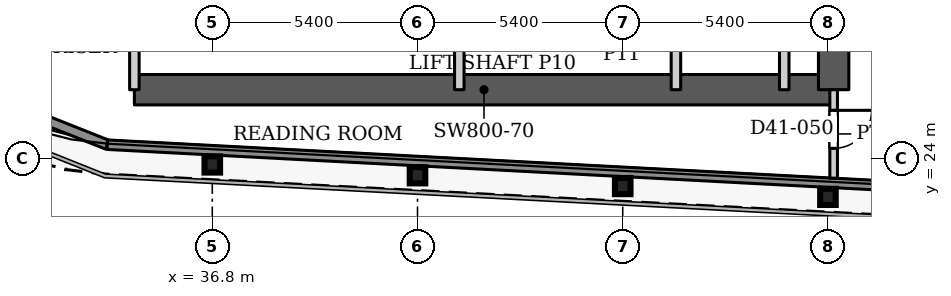
"""IFC4 building model, lengths in metres.
Left out: names, types, materials, properties, quantities, classifications, styles, units other than length and angle.
Written with IfcOpenShell. Run it as: python <this file> out.ifc"""

import sys

from ifc_helpers import new_model, si_unit, direction, frame, frame_2d, origin, origin_2d, place, context, subcontext, project, spatial, rectangle, i_section, extrude, source, transform, mapped, element, fill, save


model = new_model("IFC4")
c1 = context("Model", 3, precision=1e-05, world=origin(), true_north=direction((0.0, 1.0)))
c2 = subcontext(c1, "Body", "Model", "MODEL_VIEW")
j1 = project(units=[si_unit("LENGTHUNIT", "METRE"), si_unit("PLANEANGLEUNIT", "RADIAN")], contexts=[c1])
p1 = place(None, origin())
s1 = spatial("IfcSite", under=j1, at=p1, CompositionType="ELEMENT")
p2 = place(p1, origin())
s2 = spatial("IfcBuilding", under=s1, at=p2, CompositionType="ELEMENT")
p3 = place(p2, frame((0.0, 0.0, 176.0)))
s3 = spatial("IfcBuildingStorey", under=s2, at=p3, CompositionType="ELEMENT", Elevation=176.0)
for number, where, z_axis, x_axis in (
    (1, (53.0, 22.98, 0.0), (0.0, 0.0, 1.0), (1.0, 0.0, 0.0)),
    (2, (47.6, 23.264, 0.0), (0.0, 0.0, 1.0), (1.0, 0.0, 0.0)),
    (3, (42.2, 23.548, 0.0), (0.0, 0.0, 1.0), (1.0, 0.0, 0.0)),
    (4, (36.8, 23.832, 0.0), (0.0, 0.0, 1.0), (1.0, 0.0, 0.0)),
):
    element("IfcColumn", number, at=place(p3, frame(where, z_axis=z_axis, x_axis=x_axis)), inside=s3, PredefinedType="COLUMN", context=c2, shape_type="SweptSolid", body=[
        extrude(i_section(OverallWidth=0.409, OverallDepth=0.425, WebThickness=0.033, FlangeThickness=0.052, FilletRadius=0.013, at=origin_2d()), origin(), (0.0, 0.0, 1.0), 3.9),
    ])
p4 = place(p3, frame((34.75, 25.8, 0.0), z_axis=(0.0, 0.0, 1.0), x_axis=(1.0, 0.0, 0.0)))
e5 = element("IfcWall", 5, at=p4, inside=s3, PredefinedType="SHEAR", context=c2, shape_type="SweptSolid", body=[
    extrude(rectangle(XDim=18.4, YDim=0.8, at=frame_2d((9.2, 0.0))), origin(), (0.0, 0.0, 1.0), 3.9),
])
p5 = place(p3, frame((53.15, 25.8, 0.0), z_axis=(0.0, 0.0, 1.0), x_axis=(0.0, 1.0, 0.0)))
e6 = element("IfcWall", 6, at=p5, inside=s3, PredefinedType="SHEAR", context=c2, shape_type="SweptSolid", body=[
    extrude(rectangle(XDim=10.4, YDim=0.8, at=frame_2d((5.2, 0.0))), origin(), (0.0, 0.0, 1.0), 3.9),
])
p6 = place(p3, frame((34.039, 24.353, 0.0), z_axis=(0.0, 0.0, 1.0), x_axis=(-0.929352825399, 0.369192803184, 0.0)))
e7 = element("IfcWall", 7, at=p6, inside=s3, PredefinedType="SOLIDWALL", context=c2, shape_type="SweptSolid", body=[
    extrude(rectangle(XDim=4.656, YDim=0.25, at=frame_2d((2.328, 0.0))), origin(), (0.0, 0.0, 1.0), 3.75),
])
p7 = place(p3, frame((100.586, 20.85, 0.0), z_axis=(0.0, 0.0, 1.0), x_axis=(-0.99861746497, 0.052565755559, 0.0)))
e8 = element("IfcWall", 8, at=p7, inside=s3, PredefinedType="SOLIDWALL", context=c2, shape_type="SweptSolid", body=[
    extrude(rectangle(XDim=66.639, YDim=0.25, at=frame_2d((33.319, 0.0))), origin(), (0.0, 0.0, 1.0), 3.75),
])
for number, where, z_axis, x_axis in (
    (9, (34.75, 25.8, 0.0), (0.0, 0.0, 1.0), (0.0, 1.0, 0.0)),
    (10, (43.3, 25.8, 0.0), (0.0, 0.0, 1.0), (0.0, 1.0, 0.0)),
    (11, (49.0, 25.8, 0.0), (0.0, 0.0, 1.0), (0.0, 1.0, 0.0)),
    (12, (51.85, 25.8, 0.0), (0.0, 0.0, 1.0), (0.0, 1.0, 0.0)),
):
    element("IfcWall", number, at=place(p3, frame(where, z_axis=z_axis, x_axis=x_axis)), inside=s3, PredefinedType="PARTITIONING", context=c2, shape_type="SweptSolid", body=[
        extrude(rectangle(XDim=3.25, YDim=0.25, at=frame_2d((1.625, 0.0))), origin(), (0.0, 0.0, 1.0), 3.9),
    ])
p8 = place(p3, frame((53.15, 23.472, 0.0), z_axis=(0.0, 0.0, 1.0), x_axis=(0.0, 1.0, 0.0)))
e13 = element("IfcWall", 13, at=p8, inside=s3, PredefinedType="PARTITIONING", context=c2, shape_type="SweptSolid", body=[
    extrude(rectangle(XDim=2.328, YDim=0.2, at=frame_2d((1.164, 0.0))), origin(), (0.0, 0.0, 1.0), 3.6),
])
p9 = place(p8, frame((0.785, 0.0, 0.0)))
e14 = element("IfcOpeningElement", 14, at=p9, cuts=e13, PredefinedType="OPENING", context=c2, shape_type="SweptSolid", body=[
    extrude(rectangle(XDim=1.0, YDim=2.1, at=frame_2d((0.5, 1.05))), frame((0.0, 0.11, 0.0), z_axis=(0.0, -1.0, 0.0), x_axis=(1.0, 0.0, 0.0)), (0.0, 0.0, 1.0), 0.22),
])
m1 = source(origin(), c2, "Body", "SweptSolid", [
    extrude(rectangle(XDim=1.0, YDim=2.1, at=frame_2d((0.5, 1.05))), frame((0.0, 0.025, 0.0), z_axis=(0.0, -1.0, 0.0), x_axis=(1.0, 0.0, 0.0)), (0.0, 0.0, 1.0), 0.05),
])
p10 = place(p9, origin())
e15 = element("IfcDoor", 15, at=p10, inside=s3, OperationType="SINGLE_SWING_RIGHT", PredefinedType="DOOR", context=c2, shape_type="MappedRepresentation", body=[
    mapped(m1, transform((0.0, 0.0, 0.0), x_axis=(1.0, 0.0, 0.0), y_axis=(0.0, 1.0, 0.0), z_axis=(0.0, 0.0, 1.0), scale=1.0)),
])
fill(e14, e15)
save(model, sys.argv[1])
